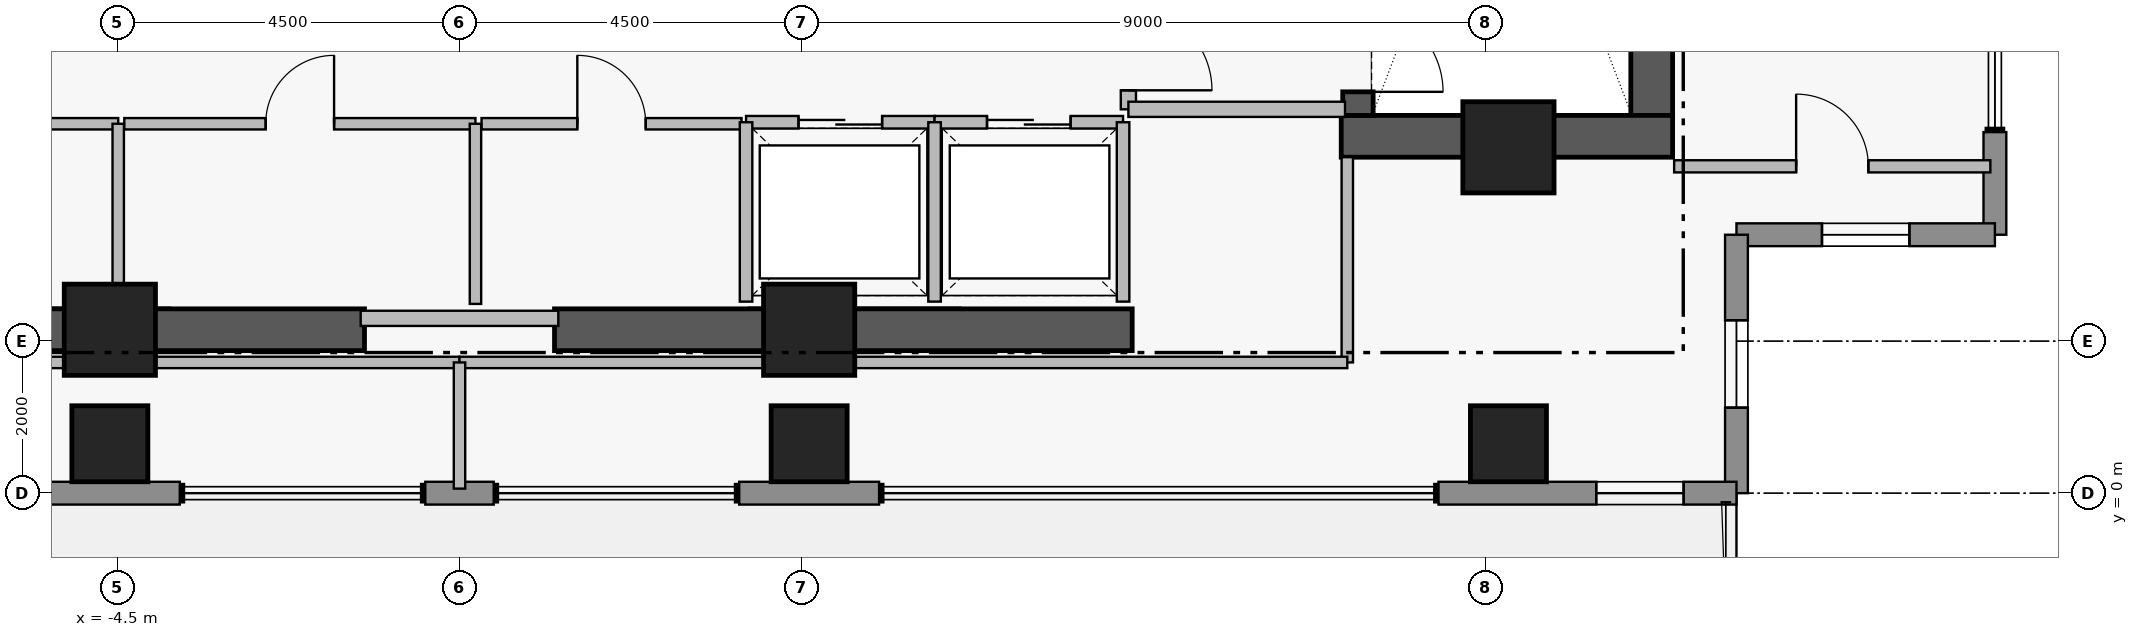
"""IFC4 building model, lengths in metres.
Left out: names, types, materials, properties, quantities, classifications, styles, units other than length and angle.
Written with IfcOpenShell. Run it as: python <this file> out.ifc"""

import sys

from ifc_helpers import new_model, si_unit, direction, frame, frame_2d, origin, origin_2d, place, context, subcontext, project, spatial, rectangle, extrude, element, fill, save


model = new_model("IFC4")
c1 = context("Model", 3, precision=1e-05, world=origin(), true_north=direction((0.0, 1.0)))
c2 = subcontext(c1, "Body", "Model", "MODEL_VIEW")
j1 = project(units=[si_unit("LENGTHUNIT", "METRE"), si_unit("PLANEANGLEUNIT", "RADIAN")], contexts=[c1])
p1 = place(None, origin())
s1 = spatial("IfcSite", under=j1, at=p1, CompositionType="ELEMENT")
p2 = place(p1, origin())
s2 = spatial("IfcBuilding", under=s1, at=p2, CompositionType="ELEMENT")
p3 = place(p2, frame((0.0, 0.0, 284.05)))
s3 = spatial("IfcBuildingStorey", under=s2, at=p3, CompositionType="ELEMENT", Elevation=284.05)
p4 = place(p3, frame((15.685, 4.97, 0.0), z_axis=(0.0, 0.0, 1.0), x_axis=(0.0, 1.0, 0.0)))
e1 = element("IfcWall", 1, at=p4, inside=s3, PredefinedType="SHEAR", context=c2, shape_type="SweptSolid", body=[
    extrude(rectangle(XDim=8.96, YDim=0.55, at=frame_2d((4.48, 0.0))), origin(), (0.0, 0.0, 1.0), 4.21),
])
p5 = place(p3, frame((11.6, 4.695, 0.0), z_axis=(0.0, 0.0, 1.0), x_axis=(1.0, 0.0, 0.0)))
e2 = element("IfcWall", 2, at=p5, inside=s3, PredefinedType="SHEAR", context=c2, shape_type="SweptSolid", body=[
    extrude(rectangle(XDim=4.36, YDim=0.55, at=frame_2d((2.18, 0.0))), origin(), (0.0, 0.0, 1.0), 4.21),
])
for number, where, z_axis, x_axis in (
    (3, (-8.85, 2.15, 0.0), (0.0, 0.0, 1.0), (1.0, 0.0, 0.0)),
    (4, (1.25, 2.15, 0.0), (0.0, 0.0, 1.0), (1.0, 0.0, 0.0)),
):
    element("IfcWall", number, at=place(p3, frame(where, z_axis=z_axis, x_axis=x_axis)), inside=s3, PredefinedType="SHEAR", context=c2, shape_type="SweptSolid", body=[
        extrude(rectangle(XDim=7.6, YDim=0.55, at=frame_2d((3.8, 0.0))), origin(), (0.0, 0.0, 1.0), 4.18),
    ])
p6 = place(p3, frame((11.82, 13.93, 0.0), z_axis=(0.0, 0.0, 1.0), x_axis=(0.0, -1.0, 0.0)))
e5 = element("IfcWall", 5, at=p6, inside=s3, PredefinedType="SHEAR", context=c2, shape_type="SweptSolid", body=[
    extrude(rectangle(XDim=8.96, YDim=0.4, at=frame_2d((4.48, 0.0))), origin(), (0.0, 0.0, 1.0), 4.21),
])
p7 = place(p6, frame((7.53, 0.0, 0.0)))
e6 = element("IfcOpeningElement", 6, at=p7, cuts=e5, PredefinedType="OPENING", context=c2, shape_type="SweptSolid", body=[
    extrude(rectangle(XDim=1.12, YDim=2.22, at=frame_2d((0.56, 1.11))), frame((0.0, 0.21, 0.0), z_axis=(0.0, -1.0, 0.0), x_axis=(1.0, 0.0, 0.0)), (0.0, 0.0, 1.0), 0.42),
])
for number, where, z_axis, x_axis in (
    (7, (-4.6, 2.15, 0.0), (0.0, 0.0, 1.0), (1.0, 0.0, 0.0)),
    (8, (4.6, 2.15, 0.0), (0.0, 0.0, 1.0), (1.0, 0.0, 0.0)),
    (9, (13.8, 4.55, 0.0), (0.0, 0.0, 1.0), (1.0, 0.0, 0.0)),
):
    element("IfcColumn", number, at=place(p3, frame(where, z_axis=z_axis, x_axis=x_axis)), inside=s3, PredefinedType="COLUMN", context=c2, shape_type="SweptSolid", body=[
        extrude(rectangle(XDim=1.2, YDim=1.2, at=origin_2d()), origin(), (0.0, 0.0, 1.0), 4.4),
    ])
for number, where, z_axis, x_axis in (
    (10, (-4.6, 0.65, 0.0), (0.0, 0.0, 1.0), (1.0, 0.0, 0.0)),
    (11, (4.6, 0.65, 0.0), (0.0, 0.0, 1.0), (1.0, 0.0, 0.0)),
    (12, (13.8, 0.65, 0.0), (0.0, 0.0, 1.0), (1.0, 0.0, 0.0)),
):
    element("IfcColumn", number, at=place(p3, frame(where, z_axis=z_axis, x_axis=x_axis)), inside=s3, PredefinedType="COLUMN", context=c2, shape_type="SweptSolid", body=[
        extrude(rectangle(XDim=1.0, YDim=1.0, at=origin_2d()), origin(), (0.0, 0.0, 1.0), 4.4),
    ])
p8 = place(p3, frame((20.2, 4.75, 0.0), z_axis=(0.0, 0.0, 1.0), x_axis=(0.0, -1.0, 0.0)))
e13 = element("IfcWall", 13, at=p8, inside=s3, PredefinedType="STANDARD", context=c2, shape_type="SweptSolid", body=[
    extrude(rectangle(XDim=1.35, YDim=0.3, at=frame_2d((0.675, 0.0))), origin(), (0.0, 0.0, 1.0), 4.18),
])
p9 = place(p3, frame((20.2, 3.4, 0.0), z_axis=(0.0, 0.0, 1.0), x_axis=(-1.0, 0.0, 0.0)))
e14 = element("IfcWall", 14, at=p9, inside=s3, PredefinedType="STANDARD", context=c2, shape_type="SweptSolid", body=[
    extrude(rectangle(XDim=3.4, YDim=0.3, at=frame_2d((1.7, 0.0))), origin(), (0.0, 0.0, 1.0), 4.18),
])
p10 = place(p9, frame((1.125, 0.0, 1.25)))
e15 = element("IfcOpeningElement", 15, at=p10, cuts=e14, PredefinedType="OPENING", context=c2, shape_type="SweptSolid", body=[
    extrude(rectangle(XDim=1.15, YDim=1.55, at=frame_2d((0.575, 0.775))), frame((0.0, 0.16, 0.0), z_axis=(0.0, -1.0, 0.0), x_axis=(1.0, 0.0, 0.0)), (0.0, 0.0, 1.0), 0.32),
])
p11 = place(p3, frame((16.8, 3.4, 0.0), z_axis=(0.0, 0.0, 1.0), x_axis=(0.0, -1.0, 0.0)))
e16 = element("IfcWall", 16, at=p11, inside=s3, PredefinedType="STANDARD", context=c2, shape_type="SweptSolid", body=[
    extrude(rectangle(XDim=3.4, YDim=0.3, at=frame_2d((1.7, 0.0))), origin(), (0.0, 0.0, 1.0), 4.18),
])
p12 = place(p11, frame((1.125, 0.0, 1.25)))
e17 = element("IfcOpeningElement", 17, at=p12, cuts=e16, PredefinedType="OPENING", context=c2, shape_type="SweptSolid", body=[
    extrude(rectangle(XDim=1.15, YDim=1.55, at=frame_2d((0.575, 0.775))), frame((0.0, 0.16, 0.0), z_axis=(0.0, -1.0, 0.0), x_axis=(1.0, 0.0, 0.0)), (0.0, 0.0, 1.0), 0.32),
])
p13 = place(p3, frame((16.8, 0.0, 0.0), z_axis=(0.0, 0.0, 1.0), x_axis=(-1.0, 0.0, 0.0)))
e18 = element("IfcWall", 18, at=p13, inside=s3, PredefinedType="STANDARD", context=c2, shape_type="SweptSolid", body=[
    extrude(rectangle(XDim=3.92, YDim=0.3, at=frame_2d((1.96, 0.0))), origin(), (0.0, 0.0, 1.0), 4.18),
])
p14 = place(p13, frame((0.695, 0.0, 0.95)))
e19 = element("IfcOpeningElement", 19, at=p14, cuts=e18, PredefinedType="OPENING", context=c2, shape_type="SweptSolid", body=[
    extrude(rectangle(XDim=1.15, YDim=1.55, at=frame_2d((0.575, 0.775))), frame((0.0, 0.16, 0.0), z_axis=(0.0, -1.0, 0.0), x_axis=(1.0, 0.0, 0.0)), (0.0, 0.0, 1.0), 0.32),
])
p15 = place(p3, frame((5.52, 0.0, 0.0), z_axis=(0.0, 0.0, 1.0), x_axis=(-1.0, 0.0, 0.0)))
e20 = element("IfcWall", 20, at=p15, inside=s3, PredefinedType="STANDARD", context=c2, shape_type="SweptSolid", body=[
    extrude(rectangle(XDim=1.84, YDim=0.3, at=frame_2d((0.92, 0.0))), origin(), (0.0, 0.0, 1.0), 4.18),
])
p16 = place(p3, frame((0.45, 0.0, 0.0), z_axis=(0.0, 0.0, 1.0), x_axis=(-1.0, 0.0, 0.0)))
e21 = element("IfcWall", 21, at=p16, inside=s3, PredefinedType="STANDARD", context=c2, shape_type="SweptSolid", body=[
    extrude(rectangle(XDim=0.9, YDim=0.3, at=frame_2d((0.45, 0.0))), origin(), (0.0, 0.0, 1.0), 4.18),
])
p17 = place(p3, frame((-3.68, 0.0, 0.0), z_axis=(0.0, 0.0, 1.0), x_axis=(-1.0, 0.0, 0.0)))
e22 = element("IfcWall", 22, at=p17, inside=s3, PredefinedType="STANDARD", context=c2, shape_type="SweptSolid", body=[
    extrude(rectangle(XDim=4.395, YDim=0.3, at=frame_2d((2.198, 0.0))), origin(), (0.0, 0.0, 1.0), 4.18),
])
p18 = place(p17, frame((2.695, 0.0, 0.0)))
e23 = element("IfcOpeningElement", 23, at=p18, cuts=e22, PredefinedType="OPENING", context=c2, shape_type="SweptSolid", body=[
    extrude(rectangle(XDim=1.05, YDim=2.2, at=frame_2d((0.525, 1.1))), frame((0.0, 0.16, 0.0), z_axis=(0.0, -1.0, 0.0), x_axis=(1.0, 0.0, 0.0)), (0.0, 0.0, 1.0), 0.32),
])
p19 = place(p3, frame((8.8, 11.15, 0.0), z_axis=(0.0, 0.0, 1.0), x_axis=(0.0, -1.0, 0.0)))
e24 = element("IfcWall", 24, at=p19, inside=s3, PredefinedType="PARTITIONING", context=c2, shape_type="SweptSolid", body=[
    extrude(rectangle(XDim=6.1, YDim=0.2, at=frame_2d((3.05, 0.0))), origin(), (0.0, 0.0, 1.0), 4.18),
])
p20 = place(p19, frame((1.15, 0.0, 0.0)))
e25 = element("IfcOpeningElement", 25, at=p20, cuts=e24, PredefinedType="OPENING", context=c2, shape_type="SweptSolid", body=[
    extrude(rectangle(XDim=1.1, YDim=2.2, at=frame_2d((0.55, 1.1))), frame((0.0, 0.11, 0.0), z_axis=(0.0, -1.0, 0.0), x_axis=(1.0, 0.0, 0.0)), (0.0, 0.0, 1.0), 0.22),
])
p21 = place(p19, frame((4.75, 0.0, 0.0)))
e26 = element("IfcOpeningElement", 26, at=p21, cuts=e24, PredefinedType="OPENING", context=c2, shape_type="SweptSolid", body=[
    extrude(rectangle(XDim=1.1, YDim=2.2, at=frame_2d((0.55, 1.1))), frame((0.0, 0.11, 0.0), z_axis=(0.0, -1.0, 0.0), x_axis=(1.0, 0.0, 0.0)), (0.0, 0.0, 1.0), 0.22),
])
p22 = place(p3, frame((3.77, 4.88, 0.0), z_axis=(0.0, 0.0, 1.0), x_axis=(1.0, 0.0, 0.0)))
e27 = element("IfcWall", 27, at=p22, inside=s3, PredefinedType="PARTITIONING", context=c2, shape_type="SweptSolid", body=[
    extrude(rectangle(XDim=2.48, YDim=0.165, at=frame_2d((1.24, 0.0))), origin(), (0.0, 0.0, 1.0), 4.18),
])
p23 = place(p22, frame((0.69, 0.0, 0.0)))
e28 = element("IfcOpeningElement", 28, at=p23, cuts=e27, PredefinedType="OPENING", context=c2, shape_type="SweptSolid", body=[
    extrude(rectangle(XDim=1.1, YDim=2.25, at=frame_2d((0.55, 1.125))), frame((0.0, 0.093, 0.0), z_axis=(0.0, -1.0, 0.0), x_axis=(1.0, 0.0, 0.0)), (0.0, 0.0, 1.0), 0.185),
])
p24 = place(p3, frame((6.25, 4.88, 0.0), z_axis=(0.0, 0.0, 1.0), x_axis=(1.0, 0.0, 0.0)))
e29 = element("IfcWall", 29, at=p24, inside=s3, PredefinedType="PARTITIONING", context=c2, shape_type="SweptSolid", body=[
    extrude(rectangle(XDim=2.48, YDim=0.165, at=frame_2d((1.24, 0.0))), origin(), (0.0, 0.0, 1.0), 4.18),
])
p25 = place(p24, frame((0.69, 0.0, 0.0)))
e30 = element("IfcOpeningElement", 30, at=p25, cuts=e29, PredefinedType="OPENING", context=c2, shape_type="SweptSolid", body=[
    extrude(rectangle(XDim=1.1, YDim=2.25, at=frame_2d((0.55, 1.125))), frame((0.0, 0.093, 0.0), z_axis=(0.0, -1.0, 0.0), x_axis=(1.0, 0.0, 0.0)), (0.0, 0.0, 1.0), 0.185),
])
p26 = place(p3, frame((-8.71, 4.86, 0.0), z_axis=(0.0, 0.0, 1.0), x_axis=(1.0, 0.0, 0.0)))
e31 = element("IfcWall", 31, at=p26, inside=s3, PredefinedType="PARTITIONING", context=c2, shape_type="SweptSolid", body=[
    extrude(rectangle(XDim=4.22, YDim=0.15, at=frame_2d((2.11, 0.0))), origin(), (0.0, 0.0, 1.0), 4.18),
])
p27 = place(p26, frame((1.66, 0.0, 0.0)))
e32 = element("IfcOpeningElement", 32, at=p27, cuts=e31, PredefinedType="OPENING", context=c2, shape_type="SweptSolid", body=[
    extrude(rectangle(XDim=0.9, YDim=2.15, at=frame_2d((0.45, 1.075))), frame((0.0, 0.085, 0.0), z_axis=(0.0, -1.0, 0.0), x_axis=(1.0, 0.0, 0.0)), (0.0, 0.0, 1.0), 0.17),
])
p28 = place(p3, frame((-4.41, 4.86, 0.0), z_axis=(0.0, 0.0, 1.0), x_axis=(1.0, 0.0, 0.0)))
e33 = element("IfcWall", 33, at=p28, inside=s3, PredefinedType="PARTITIONING", context=c2, shape_type="SweptSolid", body=[
    extrude(rectangle(XDim=4.62, YDim=0.15, at=frame_2d((2.31, 0.0))), origin(), (0.0, 0.0, 1.0), 4.18),
])
p29 = place(p28, frame((1.86, 0.0, 0.0)))
e34 = element("IfcOpeningElement", 34, at=p29, cuts=e33, PredefinedType="OPENING", context=c2, shape_type="SweptSolid", body=[
    extrude(rectangle(XDim=0.9, YDim=2.15, at=frame_2d((0.45, 1.075))), frame((0.0, 0.085, 0.0), z_axis=(0.0, -1.0, 0.0), x_axis=(1.0, 0.0, 0.0)), (0.0, 0.0, 1.0), 0.17),
])
p30 = place(p3, frame((0.29, 4.86, 0.0), z_axis=(0.0, 0.0, 1.0), x_axis=(1.0, 0.0, 0.0)))
e35 = element("IfcWall", 35, at=p30, inside=s3, PredefinedType="PARTITIONING", context=c2, shape_type="SweptSolid", body=[
    extrude(rectangle(XDim=3.42, YDim=0.15, at=frame_2d((1.71, 0.0))), origin(), (0.0, 0.0, 1.0), 4.18),
])
p31 = place(p30, frame((1.26, 0.0, 0.0)))
e36 = element("IfcOpeningElement", 36, at=p31, cuts=e35, PredefinedType="OPENING", context=c2, shape_type="SweptSolid", body=[
    extrude(rectangle(XDim=0.9, YDim=2.15, at=frame_2d((0.45, 1.075))), frame((0.0, 0.085, 0.0), z_axis=(0.0, -1.0, 0.0), x_axis=(1.0, 0.0, 0.0)), (0.0, 0.0, 1.0), 0.17),
])
p32 = place(p3, frame((15.98, 4.3, 0.0), z_axis=(0.0, 0.0, 1.0), x_axis=(1.0, 0.0, 0.0)))
e37 = element("IfcWall", 37, at=p32, inside=s3, PredefinedType="PARTITIONING", context=c2, shape_type="SweptSolid", body=[
    extrude(rectangle(XDim=4.16, YDim=0.16, at=frame_2d((2.08, 0.0))), origin(), (0.0, 0.0, 1.0), 4.18),
])
p33 = place(p32, frame((1.605, 0.0, 0.0)))
e38 = element("IfcOpeningElement", 38, at=p33, cuts=e37, PredefinedType="OPENING", context=c2, shape_type="SweptSolid", body=[
    extrude(rectangle(XDim=0.95, YDim=2.15, at=frame_2d((0.475, 1.075))), frame((0.0, 0.09, 0.0), z_axis=(0.0, -1.0, 0.0), x_axis=(1.0, 0.0, 0.0)), (0.0, 0.0, 1.0), 0.18),
])
p34 = place(p3, frame((8.8, 5.05, 0.0), z_axis=(0.0, 0.0, 1.0), x_axis=(1.0, 0.0, 0.0)))
e39 = element("IfcWall", 39, at=p34, inside=s3, PredefinedType="PARTITIONING", context=c2, shape_type="SweptSolid", body=[
    extrude(rectangle(XDim=2.85, YDim=0.2, at=frame_2d((1.425, 0.0))), origin(), (0.0, 0.0, 1.0), 4.18),
])
for number, where, z_axis, x_axis in (
    (40, (3.77, 2.52, 0.0), (0.0, 0.0, 1.0), (0.0, 1.0, 0.0)),
    (41, (6.25, 2.52, 0.0), (0.0, 0.0, 1.0), (0.0, 1.0, 0.0)),
    (42, (8.73, 2.52, 0.0), (0.0, 0.0, 1.0), (0.0, 1.0, 0.0)),
):
    element("IfcWall", number, at=place(p3, frame(where, z_axis=z_axis, x_axis=x_axis)), inside=s3, PredefinedType="PARTITIONING", context=c2, shape_type="SweptSolid", body=[
        extrude(rectangle(XDim=2.36, YDim=0.165, at=frame_2d((1.18, 0.0))), origin(), (0.0, 0.0, 1.0), 4.18),
    ])
p35 = place(p3, frame((-1.3, 2.3, 0.0), z_axis=(0.0, 0.0, 1.0), x_axis=(1.0, 0.0, 0.0)))
e43 = element("IfcWall", 43, at=p35, inside=s3, PredefinedType="PARTITIONING", context=c2, shape_type="SweptSolid", body=[
    extrude(rectangle(XDim=2.6, YDim=0.2, at=frame_2d((1.3, 0.0))), origin(), (0.0, 0.0, 1.0), 3.08),
])
for number, where, z_axis, x_axis in (
    (44, (-4.49, 2.49, 0.0), (0.0, 0.0, 1.0), (0.0, 1.0, 0.0)),
    (45, (0.21, 2.49, 0.0), (0.0, 0.0, 1.0), (0.0, 1.0, 0.0)),
):
    element("IfcWall", number, at=place(p3, frame(where, z_axis=z_axis, x_axis=x_axis)), inside=s3, PredefinedType="PARTITIONING", context=c2, shape_type="SweptSolid", body=[
        extrude(rectangle(XDim=2.37, YDim=0.15, at=frame_2d((1.185, 0.0))), origin(), (0.0, 0.0, 1.0), 4.18),
    ])
p36 = place(p3, frame((-11.68, 1.72, 0.0), z_axis=(0.0, 0.0, 1.0), x_axis=(1.0, 0.0, 0.0)))
e46 = element("IfcWall", 46, at=p36, inside=s3, PredefinedType="PARTITIONING", context=c2, shape_type="SweptSolid", body=[
    extrude(rectangle(XDim=11.68, YDim=0.15, at=frame_2d((5.84, 0.0))), origin(), (0.0, 0.0, 1.0), 3.08),
])
p37 = place(p3, frame((11.68, 1.72, 0.0), z_axis=(0.0, 0.0, 1.0), x_axis=(0.0, 1.0, 0.0)))
e47 = element("IfcWall", 47, at=p37, inside=s3, PredefinedType="PARTITIONING", context=c2, shape_type="SweptSolid", body=[
    extrude(rectangle(XDim=2.7, YDim=0.15, at=frame_2d((1.35, 0.0))), origin(), (0.0, 0.0, 1.0), 4.18),
])
p38 = place(p3, frame((0.0, 1.72, 0.0), z_axis=(0.0, 0.0, 1.0), x_axis=(1.0, 0.0, 0.0)))
e48 = element("IfcWall", 48, at=p38, inside=s3, PredefinedType="PARTITIONING", context=c2, shape_type="SweptSolid", body=[
    extrude(rectangle(XDim=11.68, YDim=0.15, at=frame_2d((5.84, 0.0))), origin(), (0.0, 0.0, 1.0), 3.08),
])
p39 = place(p3, frame((0.0, 0.06, 0.0), z_axis=(0.0, 0.0, 1.0), x_axis=(0.0, 1.0, 0.0)))
e49 = element("IfcWall", 49, at=p39, inside=s3, PredefinedType="PARTITIONING", context=c2, shape_type="SweptSolid", body=[
    extrude(rectangle(XDim=1.66, YDim=0.15, at=frame_2d((0.83, 0.0))), origin(), (0.0, 0.0, 1.0), 4.18),
])
p40 = place(p10, origin())
e50 = element("IfcWindow", 50, at=p40, inside=s3, PartitioningType="SINGLE_PANEL", PredefinedType="WINDOW", context=c2, shape_type="SweptSolid", body=[
    extrude(rectangle(XDim=1.15, YDim=1.55, at=frame_2d((0.575, 0.775))), frame((0.0, 0.03, 0.0), z_axis=(0.0, -1.0, 0.0), x_axis=(1.0, 0.0, 0.0)), (0.0, 0.0, 1.0), 0.06),
])
fill(e15, e50)
p41 = place(p12, origin())
e51 = element("IfcWindow", 51, at=p41, inside=s3, PartitioningType="SINGLE_PANEL", PredefinedType="WINDOW", context=c2, shape_type="SweptSolid", body=[
    extrude(rectangle(XDim=1.15, YDim=1.55, at=frame_2d((0.575, 0.775))), frame((0.0, 0.03, 0.0), z_axis=(0.0, -1.0, 0.0), x_axis=(1.0, 0.0, 0.0)), (0.0, 0.0, 1.0), 0.06),
])
fill(e17, e51)
p42 = place(p14, origin())
e52 = element("IfcWindow", 52, at=p42, inside=s3, PartitioningType="SINGLE_PANEL", PredefinedType="WINDOW", context=c2, shape_type="SweptSolid", body=[
    extrude(rectangle(XDim=1.15, YDim=1.55, at=frame_2d((0.575, 0.775))), frame((0.0, 0.03, 0.0), z_axis=(0.0, -1.0, 0.0), x_axis=(1.0, 0.0, 0.0)), (0.0, 0.0, 1.0), 0.06),
])
fill(e19, e52)
p43 = place(p7, origin())
e53 = element("IfcDoor", 53, at=p43, inside=s3, OperationType="SINGLE_SWING_RIGHT", PredefinedType="DOOR", context=c2, shape_type="SweptSolid", body=[
    extrude(rectangle(XDim=1.12, YDim=2.22, at=frame_2d((0.56, 1.11))), frame((0.0, 0.025, 0.0), z_axis=(0.0, -1.0, 0.0), x_axis=(1.0, 0.0, 0.0)), (0.0, 0.0, 1.0), 0.05),
])
fill(e6, e53)
p44 = place(p21, origin())
e54 = element("IfcDoor", 54, at=p44, inside=s3, OperationType="SINGLE_SWING_RIGHT", PredefinedType="DOOR", context=c2, shape_type="SweptSolid", body=[
    extrude(rectangle(XDim=1.1, YDim=2.2, at=frame_2d((0.55, 1.1))), frame((0.0, 0.025, 0.0), z_axis=(0.0, -1.0, 0.0), x_axis=(1.0, 0.0, 0.0)), (0.0, 0.0, 1.0), 0.05),
])
fill(e26, e54)
p45 = place(p23, origin())
e55 = element("IfcDoor", 55, at=p45, inside=s3, OperationType="SLIDING_TO_LEFT", PredefinedType="DOOR", context=c2, shape_type="SweptSolid", body=[
    extrude(rectangle(XDim=1.1, YDim=2.25, at=frame_2d((0.55, 1.125))), frame((0.0, 0.025, 0.0), z_axis=(0.0, -1.0, 0.0), x_axis=(1.0, 0.0, 0.0)), (0.0, 0.0, 1.0), 0.05),
])
fill(e28, e55)
p46 = place(p25, origin())
e56 = element("IfcDoor", 56, at=p46, inside=s3, OperationType="SLIDING_TO_LEFT", PredefinedType="DOOR", context=c2, shape_type="SweptSolid", body=[
    extrude(rectangle(XDim=1.1, YDim=2.25, at=frame_2d((0.55, 1.125))), frame((0.0, 0.025, 0.0), z_axis=(0.0, -1.0, 0.0), x_axis=(1.0, 0.0, 0.0)), (0.0, 0.0, 1.0), 0.05),
])
fill(e30, e56)
p47 = place(p29, origin())
e57 = element("IfcDoor", 57, at=p47, inside=s3, OperationType="SINGLE_SWING_RIGHT", PredefinedType="DOOR", context=c2, shape_type="SweptSolid", body=[
    extrude(rectangle(XDim=0.9, YDim=2.15, at=frame_2d((0.45, 1.075))), frame((0.0, 0.025, 0.0), z_axis=(0.0, -1.0, 0.0), x_axis=(1.0, 0.0, 0.0)), (0.0, 0.0, 1.0), 0.05),
])
fill(e34, e57)
p48 = place(p31, origin())
e58 = element("IfcDoor", 58, at=p48, inside=s3, OperationType="SINGLE_SWING_LEFT", PredefinedType="DOOR", context=c2, shape_type="SweptSolid", body=[
    extrude(rectangle(XDim=0.9, YDim=2.15, at=frame_2d((0.45, 1.075))), frame((0.0, 0.025, 0.0), z_axis=(0.0, -1.0, 0.0), x_axis=(1.0, 0.0, 0.0)), (0.0, 0.0, 1.0), 0.05),
])
fill(e36, e58)
p49 = place(p33, origin())
e59 = element("IfcDoor", 59, at=p49, inside=s3, OperationType="SINGLE_SWING_LEFT", PredefinedType="DOOR", context=c2, shape_type="SweptSolid", body=[
    extrude(rectangle(XDim=0.95, YDim=2.15, at=frame_2d((0.475, 1.075))), frame((0.0, 0.025, 0.0), z_axis=(0.0, -1.0, 0.0), x_axis=(1.0, 0.0, 0.0)), (0.0, 0.0, 1.0), 0.05),
])
fill(e38, e59)
save(model, sys.argv[1])
